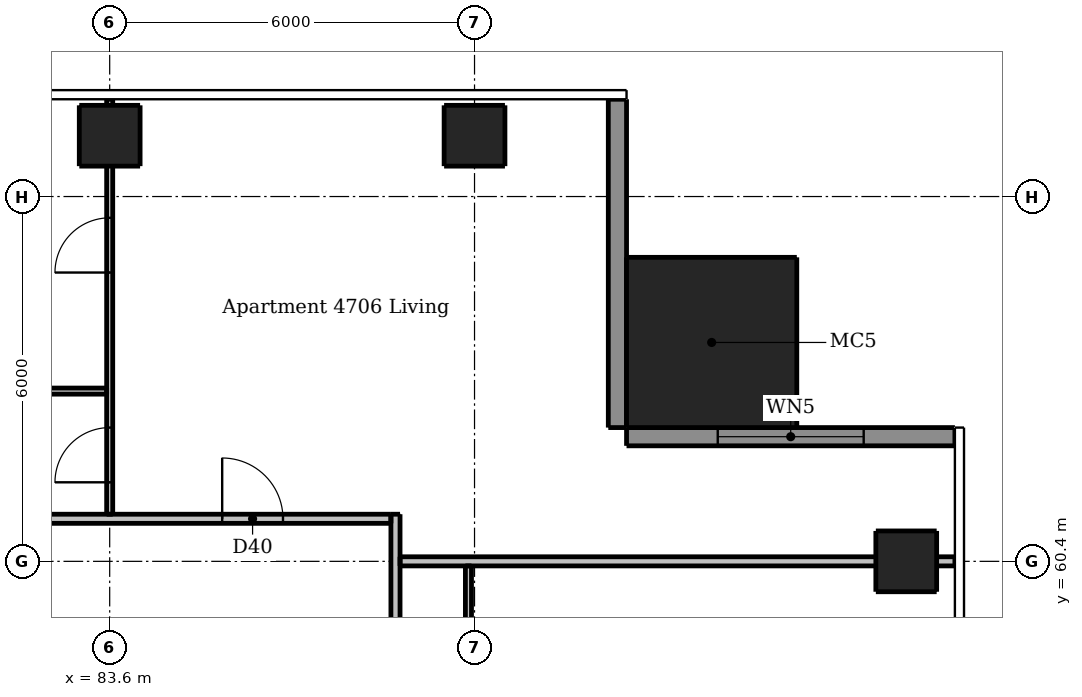
"""IFC4 building model, lengths in metres.
Left out: names, types, materials, properties, quantities, classifications, styles, units other than length and angle.
Written with IfcOpenShell. Run it as: python <this file> out.ifc"""

import sys

from ifc_helpers import new_model, si_unit, direction, frame, frame_2d, origin, origin_2d, place, context, subcontext, project, spatial, rectangle, extrude, element, fill, save


model = new_model("IFC4")
c1 = context("Model", 3, precision=1e-05, world=origin(), true_north=direction((0.0, 1.0)))
c2 = subcontext(c1, "Body", "Model", "MODEL_VIEW")
j1 = project(units=[si_unit("LENGTHUNIT", "METRE"), si_unit("PLANEANGLEUNIT", "RADIAN")], contexts=[c1])
p1 = place(None, origin())
s1 = spatial("IfcSite", under=j1, at=p1, CompositionType="ELEMENT")
p2 = place(p1, origin())
s2 = spatial("IfcBuilding", under=s1, at=p2, CompositionType="ELEMENT")
p3 = place(p2, frame((0.0, 0.0, 174.7)))
s3 = spatial("IfcBuildingStorey", under=s2, at=p3, CompositionType="ELEMENT", Elevation=174.7)
for number, where, z_axis, x_axis in (
    (1, (96.7, 60.4, 0.0), (0.0, 0.0, 1.0), (1.0, 0.0, 0.0)),
    (2, (83.6, 67.4, 0.0), (0.0, 0.0, 1.0), (1.0, 0.0, 0.0)),
    (3, (89.6, 67.4, 0.0), (0.0, 0.0, 1.0), (1.0, 0.0, 0.0)),
):
    element("IfcColumn", number, at=place(p3, frame(where, z_axis=z_axis, x_axis=x_axis)), inside=s3, PredefinedType="COLUMN", context=c2, shape_type="SweptSolid", body=[
        extrude(rectangle(XDim=1.0, YDim=1.0, at=origin_2d()), origin(), (0.0, 0.0, 1.0), 2.95),
    ])
p4 = place(p3, frame((93.5, 64.0, 0.0), z_axis=(0.0, 0.0, 1.0), x_axis=(1.0, 0.0, 0.0)))
e4 = element("IfcColumn", 4, at=p4, inside=s3, PredefinedType="COLUMN", context=c2, shape_type="SweptSolid", body=[
    extrude(rectangle(XDim=2.8, YDim=2.8, at=origin_2d()), origin(), (0.0, 0.0, 1.0), 3.3),
])
p5 = place(p3, frame((97.5, 62.45, 0.0), z_axis=(0.0, 0.0, 1.0), x_axis=(-1.0, 0.0, 0.0)))
e5 = element("IfcWall", 5, at=p5, inside=s3, PredefinedType="SOLIDWALL", context=c2, shape_type="SweptSolid", body=[
    extrude(rectangle(XDim=5.4, YDim=0.3, at=frame_2d((2.7, 0.0))), origin(), (0.0, 0.0, 1.0), 2.95),
])
p6 = place(p5, frame((1.5, 0.0, 0.15)))
e6 = element("IfcOpeningElement", 6, at=p6, cuts=e5, PredefinedType="OPENING", context=c2, shape_type="SweptSolid", body=[
    extrude(rectangle(XDim=2.4, YDim=2.1, at=frame_2d((1.2, 1.05))), frame((0.0, 0.16, 0.0), z_axis=(0.0, -1.0, 0.0), x_axis=(1.0, 0.0, 0.0)), (0.0, 0.0, 1.0), 0.32),
])
p7 = place(p3, frame((91.95, 62.6, 0.0), z_axis=(0.0, 0.0, 1.0), x_axis=(0.0, 1.0, 0.0)))
e7 = element("IfcWall", 7, at=p7, inside=s3, PredefinedType="SOLIDWALL", context=c2, shape_type="SweptSolid", body=[
    extrude(rectangle(XDim=5.4, YDim=0.3, at=frame_2d((2.7, 0.0))), origin(), (0.0, 0.0, 1.0), 2.95),
])
p8 = place(p3, frame((83.6, 61.175, 0.0), z_axis=(0.0, 0.0, 1.0), x_axis=(0.0, 1.0, 0.0)))
e8 = element("IfcWall", 8, at=p8, inside=s3, PredefinedType="PARTITIONING", context=c2, shape_type="SweptSolid", body=[
    extrude(rectangle(XDim=6.825, YDim=0.1, at=frame_2d((3.413, 0.0))), origin(), (0.0, 0.0, 1.0), 2.332),
])
p9 = place(p8, frame((0.525, 0.0, 0.0)))
e9 = element("IfcOpeningElement", 9, at=p9, cuts=e8, PredefinedType="OPENING", context=c2, shape_type="SweptSolid", body=[
    extrude(rectangle(XDim=0.9, YDim=2.1, at=frame_2d((0.45, 1.05))), frame((0.0, 0.06, 0.0), z_axis=(0.0, -1.0, 0.0), x_axis=(1.0, 0.0, 0.0)), (0.0, 0.0, 1.0), 0.12),
])
p10 = place(p8, frame((3.975, 0.0, 0.0)))
e10 = element("IfcOpeningElement", 10, at=p10, cuts=e8, PredefinedType="OPENING", context=c2, shape_type="SweptSolid", body=[
    extrude(rectangle(XDim=0.9, YDim=2.1, at=frame_2d((0.45, 1.05))), frame((0.0, 0.06, 0.0), z_axis=(0.0, -1.0, 0.0), x_axis=(1.0, 0.0, 0.0)), (0.0, 0.0, 1.0), 0.12),
])
p11 = place(p3, frame((89.5, 60.325, 0.0), z_axis=(0.0, 0.0, 1.0), x_axis=(0.0, -1.0, 0.0)))
e11 = element("IfcWall", 11, at=p11, inside=s3, PredefinedType="PARTITIONING", context=c2, shape_type="SweptSolid", body=[
    extrude(rectangle(XDim=20.85, YDim=0.1, at=frame_2d((10.425, 0.0))), origin(), (0.0, 0.0, 1.0), 2.332),
])
p12 = place(p11, frame((9.675, 0.0, 0.0)))
e12 = element("IfcOpeningElement", 12, at=p12, cuts=e11, PredefinedType="OPENING", context=c2, shape_type="SweptSolid", body=[
    extrude(rectangle(XDim=0.9, YDim=2.1, at=frame_2d((0.45, 1.05))), frame((0.0, 0.06, 0.0), z_axis=(0.0, -1.0, 0.0), x_axis=(1.0, 0.0, 0.0)), (0.0, 0.0, 1.0), 0.12),
])
p13 = place(p11, frame((6.675, 0.0, 0.0)))
e13 = element("IfcOpeningElement", 13, at=p13, cuts=e11, PredefinedType="OPENING", context=c2, shape_type="SweptSolid", body=[
    extrude(rectangle(XDim=0.9, YDim=2.1, at=frame_2d((0.45, 1.05))), frame((0.0, 0.06, 0.0), z_axis=(0.0, -1.0, 0.0), x_axis=(1.0, 0.0, 0.0)), (0.0, 0.0, 1.0), 0.12),
])
p14 = place(p11, frame((18.975, 0.0, 0.0)))
e14 = element("IfcOpeningElement", 14, at=p14, cuts=e11, PredefinedType="OPENING", context=c2, shape_type="SweptSolid", body=[
    extrude(rectangle(XDim=0.9, YDim=2.1, at=frame_2d((0.45, 1.05))), frame((0.0, 0.06, 0.0), z_axis=(0.0, -1.0, 0.0), x_axis=(1.0, 0.0, 0.0)), (0.0, 0.0, 1.0), 0.12),
])
p15 = place(p11, frame((15.975, 0.0, 0.0)))
e15 = element("IfcOpeningElement", 15, at=p15, cuts=e11, PredefinedType="OPENING", context=c2, shape_type="SweptSolid", body=[
    extrude(rectangle(XDim=0.9, YDim=2.1, at=frame_2d((0.45, 1.05))), frame((0.0, 0.06, 0.0), z_axis=(0.0, -1.0, 0.0), x_axis=(1.0, 0.0, 0.0)), (0.0, 0.0, 1.0), 0.12),
])
p16 = place(p11, frame((12.975, 0.0, 0.0)))
e16 = element("IfcOpeningElement", 16, at=p16, cuts=e11, PredefinedType="OPENING", context=c2, shape_type="SweptSolid", body=[
    extrude(rectangle(XDim=0.9, YDim=2.1, at=frame_2d((0.45, 1.05))), frame((0.0, 0.06, 0.0), z_axis=(0.0, -1.0, 0.0), x_axis=(1.0, 0.0, 0.0)), (0.0, 0.0, 1.0), 0.12),
])
p17 = place(p11, frame((1.275, 0.0, 0.0)))
e17 = element("IfcOpeningElement", 17, at=p17, cuts=e11, PredefinedType="OPENING", context=c2, shape_type="SweptSolid", body=[
    extrude(rectangle(XDim=0.9, YDim=2.1, at=frame_2d((0.45, 1.05))), frame((0.0, 0.06, 0.0), z_axis=(0.0, -1.0, 0.0), x_axis=(1.0, 0.0, 0.0)), (0.0, 0.0, 1.0), 0.12),
])
p18 = place(p11, frame((4.325, 0.0, 0.0)))
e18 = element("IfcOpeningElement", 18, at=p18, cuts=e11, PredefinedType="OPENING", context=c2, shape_type="SweptSolid", body=[
    extrude(rectangle(XDim=0.8, YDim=2.1, at=frame_2d((0.4, 1.05))), frame((0.0, 0.06, 0.0), z_axis=(0.0, -1.0, 0.0), x_axis=(1.0, 0.0, 0.0)), (0.0, 0.0, 1.0), 0.12),
])
p19 = place(p3, frame((83.55, 63.2, 0.0), z_axis=(0.0, 0.0, 1.0), x_axis=(-1.0, 0.0, 0.0)))
e19 = element("IfcWall", 19, at=p19, inside=s3, PredefinedType="PARTITIONING", context=c2, shape_type="SweptSolid", body=[
    extrude(rectangle(XDim=5.875, YDim=0.1, at=frame_2d((2.938, 0.0))), origin(), (0.0, 0.0, 1.0), 2.95),
])
p20 = place(p19, frame((3.75, 0.0, 0.0)))
e20 = element("IfcOpeningElement", 20, at=p20, cuts=e19, PredefinedType="OPENING", context=c2, shape_type="SweptSolid", body=[
    extrude(rectangle(XDim=0.8, YDim=2.1, at=frame_2d((0.4, 1.05))), frame((0.0, 0.06, 0.0), z_axis=(0.0, -1.0, 0.0), x_axis=(1.0, 0.0, 0.0)), (0.0, 0.0, 1.0), 0.12),
])
p21 = place(p3, frame((88.3, 61.175, 0.0), z_axis=(0.0, 0.0, 1.0), x_axis=(0.0, -1.0, 0.0)))
e21 = element("IfcWall", 21, at=p21, inside=s3, PredefinedType="PARTITIONING", context=c2, shape_type="SweptSolid", body=[
    extrude(rectangle(XDim=29.4, YDim=0.15, at=frame_2d((14.7, 0.0))), origin(), (0.0, 0.0, 1.0), 2.95),
])
p22 = place(p21, frame((28.125, 0.0, 0.0)))
e22 = element("IfcOpeningElement", 22, at=p22, cuts=e21, PredefinedType="OPENING", context=c2, shape_type="SweptSolid", body=[
    extrude(rectangle(XDim=1.0, YDim=2.1, at=frame_2d((0.5, 1.05))), frame((0.0, 0.085, 0.0), z_axis=(0.0, -1.0, 0.0), x_axis=(1.0, 0.0, 0.0)), (0.0, 0.0, 1.0), 0.17),
])
p23 = place(p21, frame((10.775, 0.0, 0.0)))
e23 = element("IfcOpeningElement", 23, at=p23, cuts=e21, PredefinedType="OPENING", context=c2, shape_type="SweptSolid", body=[
    extrude(rectangle(XDim=1.0, YDim=2.1, at=frame_2d((0.5, 1.05))), frame((0.0, 0.085, 0.0), z_axis=(0.0, -1.0, 0.0), x_axis=(1.0, 0.0, 0.0)), (0.0, 0.0, 1.0), 0.17),
])
p24 = place(p3, frame((58.975, 61.1, 0.0), z_axis=(0.0, 0.0, 1.0), x_axis=(1.0, 0.0, 0.0)))
e24 = element("IfcWall", 24, at=p24, inside=s3, PredefinedType="PARTITIONING", context=c2, shape_type="SweptSolid", body=[
    extrude(rectangle(XDim=29.25, YDim=0.15, at=frame_2d((14.625, 0.0))), origin(), (0.0, 0.0, 1.0), 2.95),
])
p25 = place(p24, frame((9.125, 0.0, 0.0)))
e25 = element("IfcOpeningElement", 25, at=p25, cuts=e24, PredefinedType="OPENING", context=c2, shape_type="SweptSolid", body=[
    extrude(rectangle(XDim=1.0, YDim=2.1, at=frame_2d((0.5, 1.05))), frame((0.0, 0.085, 0.0), z_axis=(0.0, -1.0, 0.0), x_axis=(1.0, 0.0, 0.0)), (0.0, 0.0, 1.0), 0.17),
])
p26 = place(p24, frame((26.475, 0.0, 0.0)))
e26 = element("IfcOpeningElement", 26, at=p26, cuts=e24, PredefinedType="OPENING", context=c2, shape_type="SweptSolid", body=[
    extrude(rectangle(XDim=1.0, YDim=2.1, at=frame_2d((0.5, 1.05))), frame((0.0, 0.085, 0.0), z_axis=(0.0, -1.0, 0.0), x_axis=(1.0, 0.0, 0.0)), (0.0, 0.0, 1.0), 0.17),
])
p27 = place(p3, frame((88.375, 60.4, 0.0), z_axis=(0.0, 0.0, 1.0), x_axis=(1.0, 0.0, 0.0)))
e27 = element("IfcWall", 27, at=p27, inside=s3, PredefinedType="PARTITIONING", context=c2, shape_type="SweptSolid", body=[
    extrude(rectangle(XDim=9.125, YDim=0.15, at=frame_2d((4.562, 0.0))), origin(), (0.0, 0.0, 1.0), 2.332),
])
p28 = place(p6, origin())
e28 = element("IfcWindow", 28, at=p28, inside=s3, PartitioningType="DOUBLE_PANEL_VERTICAL", PredefinedType="WINDOW", context=c2, shape_type="SweptSolid", body=[
    extrude(rectangle(XDim=2.4, YDim=2.1, at=frame_2d((1.2, 1.05))), frame((0.0, 0.03, 0.0), z_axis=(0.0, -1.0, 0.0), x_axis=(1.0, 0.0, 0.0)), (0.0, 0.0, 1.0), 0.06),
])
fill(e6, e28)
p29 = place(p26, origin())
e29 = element("IfcDoor", 29, at=p29, inside=s3, OperationType="SINGLE_SWING_LEFT", PredefinedType="DOOR", context=c2, shape_type="SweptSolid", body=[
    extrude(rectangle(XDim=1.0, YDim=2.1, at=frame_2d((0.5, 1.05))), frame((0.0, 0.025, 0.0), z_axis=(0.0, -1.0, 0.0), x_axis=(1.0, 0.0, 0.0)), (0.0, 0.0, 1.0), 0.05),
])
fill(e26, e29)
p30 = place(p9, origin())
e30 = element("IfcDoor", 30, at=p30, inside=s3, OperationType="SINGLE_SWING_LEFT", PredefinedType="DOOR", context=c2, shape_type="SweptSolid", body=[
    extrude(rectangle(XDim=0.9, YDim=2.1, at=frame_2d((0.45, 1.05))), frame((0.0, 0.025, 0.0), z_axis=(0.0, -1.0, 0.0), x_axis=(1.0, 0.0, 0.0)), (0.0, 0.0, 1.0), 0.05),
])
fill(e9, e30)
p31 = place(p10, origin())
e31 = element("IfcDoor", 31, at=p31, inside=s3, OperationType="SINGLE_SWING_LEFT", PredefinedType="DOOR", context=c2, shape_type="SweptSolid", body=[
    extrude(rectangle(XDim=0.9, YDim=2.1, at=frame_2d((0.45, 1.05))), frame((0.0, 0.025, 0.0), z_axis=(0.0, -1.0, 0.0), x_axis=(1.0, 0.0, 0.0)), (0.0, 0.0, 1.0), 0.05),
])
fill(e10, e31)
save(model, sys.argv[1])
